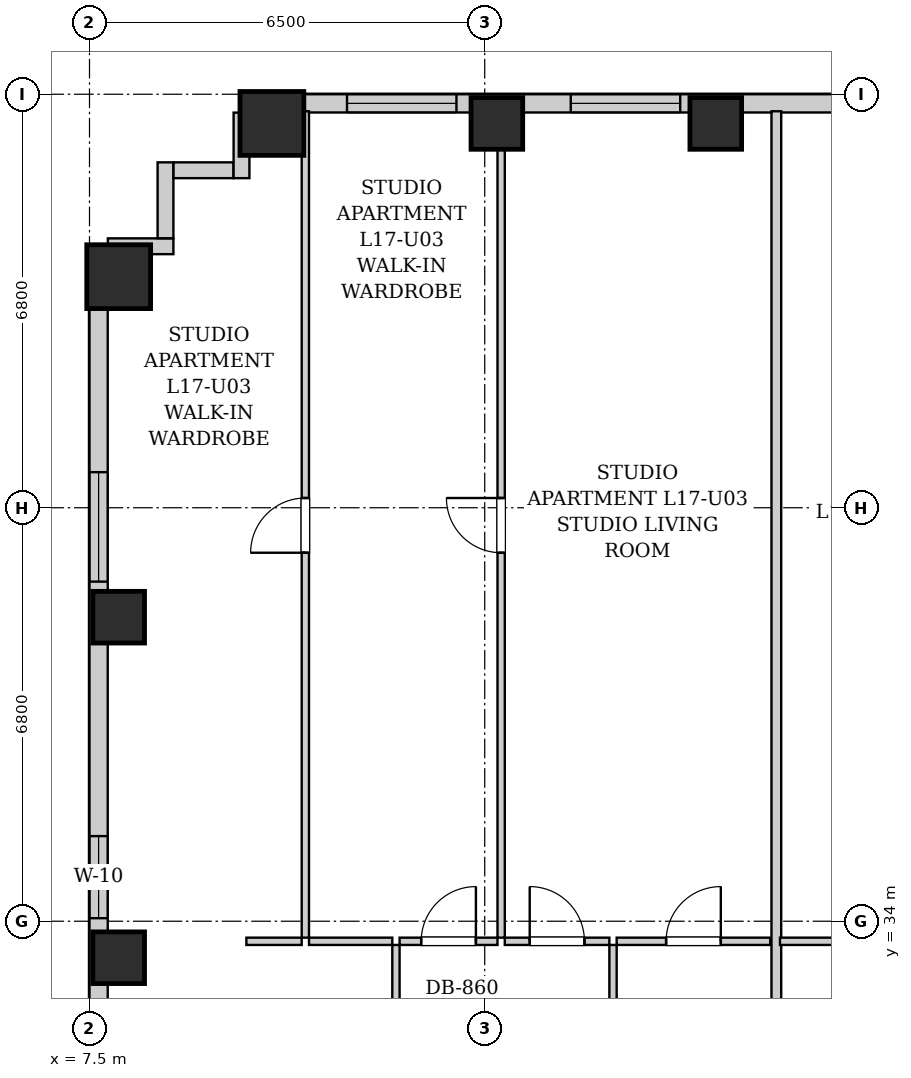
"""IFC4 building model, lengths in metres.
Left out: names, types, materials, properties, quantities, classifications, styles, units other than length and angle.
Written with IfcOpenShell. Run it as: python <this file> out.ifc"""

import sys

from ifc_helpers import new_model, si_unit, direction, frame, frame_2d, origin, origin_2d, place, context, subcontext, project, spatial, rectangle, extrude, element, fill, save


model = new_model("IFC4")
c1 = context("Model", 3, precision=1e-05, world=origin(), true_north=direction((0.0, 1.0)))
c2 = subcontext(c1, "Body", "Model", "MODEL_VIEW")
j1 = project(units=[si_unit("LENGTHUNIT", "METRE"), si_unit("PLANEANGLEUNIT", "RADIAN")], contexts=[c1])
p1 = place(None, origin())
s1 = spatial("IfcSite", under=j1, at=p1, CompositionType="ELEMENT")
p2 = place(p1, origin())
s2 = spatial("IfcBuilding", under=s1, at=p2, CompositionType="ELEMENT")
p3 = place(p2, frame((0.0, 0.0, 64.2)))
s3 = spatial("IfcBuildingStorey", under=s2, at=p3, CompositionType="ELEMENT", Elevation=64.2)
p4 = place(p3, frame((10.5, 47.12, 0.0), z_axis=(0.0, 0.0, 1.0), x_axis=(1.0, 0.0, 0.0)))
e1 = element("IfcColumn", 1, at=p4, inside=s3, PredefinedType="COLUMN", context=c2, shape_type="SweptSolid", body=[
    extrude(rectangle(XDim=1.05, YDim=1.05, at=origin_2d()), origin(), (0.0, 0.0, 1.0), 3.2),
])
for number, where, z_axis, x_axis in (
    (2, (14.2, 47.12, 0.0), (0.0, 0.0, 1.0), (1.0, 0.0, 0.0)),
    (3, (17.8, 47.12, 0.0), (0.0, 0.0, 1.0), (1.0, 0.0, 0.0)),
    (4, (7.98, 33.4, 0.0), (0.0, 0.0, 1.0), (1.0, 0.0, 0.0)),
    (5, (7.98, 39.0, 0.0), (0.0, 0.0, 1.0), (1.0, 0.0, 0.0)),
):
    element("IfcColumn", number, at=place(p3, frame(where, z_axis=z_axis, x_axis=x_axis)), inside=s3, PredefinedType="COLUMN", context=c2, shape_type="SweptSolid", body=[
        extrude(rectangle(XDim=0.85, YDim=0.85, at=origin_2d()), origin(), (0.0, 0.0, 1.0), 3.2),
    ])
p5 = place(p3, frame((7.98, 44.6, 0.0), z_axis=(0.0, 0.0, 1.0), x_axis=(1.0, 0.0, 0.0)))
e6 = element("IfcColumn", 6, at=p5, inside=s3, PredefinedType="COLUMN", context=c2, shape_type="SweptSolid", body=[
    extrude(rectangle(XDim=1.05, YDim=1.05, at=origin_2d()), origin(), (0.0, 0.0, 1.0), 3.2),
])
p6 = place(p3, frame((10.0, 47.45, 0.0), z_axis=(0.0, 0.0, 1.0), x_axis=(1.0, 0.0, 0.0)))
e7 = element("IfcWall", 7, at=p6, inside=s3, PredefinedType="SOLIDWALL", context=c2, shape_type="SweptSolid", body=[
    extrude(rectangle(XDim=26.35, YDim=0.3, at=frame_2d((13.175, 0.0))), origin(), (0.0, 0.0, 1.0), 1.975),
])
p7 = place(p6, frame((1.735, 0.0, 0.55)))
e8 = element("IfcOpeningElement", 8, at=p7, cuts=e7, PredefinedType="OPENING", context=c2, shape_type="SweptSolid", body=[
    extrude(rectangle(XDim=1.8, YDim=1.2, at=frame_2d((0.9, 0.6))), frame((0.0, 0.16, 0.0), z_axis=(0.0, -1.0, 0.0), x_axis=(1.0, 0.0, 0.0)), (0.0, 0.0, 1.0), 0.32),
])
p8 = place(p6, frame((5.415, 0.0, 0.55)))
e9 = element("IfcOpeningElement", 9, at=p8, cuts=e7, PredefinedType="OPENING", context=c2, shape_type="SweptSolid", body=[
    extrude(rectangle(XDim=1.8, YDim=1.2, at=frame_2d((0.9, 0.6))), frame((0.0, 0.16, 0.0), z_axis=(0.0, -1.0, 0.0), x_axis=(1.0, 0.0, 0.0)), (0.0, 0.0, 1.0), 0.32),
])
p9 = place(p6, frame((10.618, 0.0, 0.55)))
e10 = element("IfcOpeningElement", 10, at=p9, cuts=e7, PredefinedType="OPENING", context=c2, shape_type="SweptSolid", body=[
    extrude(rectangle(XDim=1.8, YDim=1.2, at=frame_2d((0.9, 0.6))), frame((0.0, 0.16, 0.0), z_axis=(0.0, -1.0, 0.0), x_axis=(1.0, 0.0, 0.0)), (0.0, 0.0, 1.0), 0.32),
])
p10 = place(p6, frame((17.696, 0.0, 0.55)))
e11 = element("IfcOpeningElement", 11, at=p10, cuts=e7, PredefinedType="OPENING", context=c2, shape_type="SweptSolid", body=[
    extrude(rectangle(XDim=1.8, YDim=1.2, at=frame_2d((0.9, 0.6))), frame((0.0, 0.16, 0.0), z_axis=(0.0, -1.0, 0.0), x_axis=(1.0, 0.0, 0.0)), (0.0, 0.0, 1.0), 0.32),
])
p11 = place(p6, frame((20.815, 0.0, 0.55)))
e12 = element("IfcOpeningElement", 12, at=p11, cuts=e7, PredefinedType="OPENING", context=c2, shape_type="SweptSolid", body=[
    extrude(rectangle(XDim=1.8, YDim=1.2, at=frame_2d((0.9, 0.6))), frame((0.0, 0.16, 0.0), z_axis=(0.0, -1.0, 0.0), x_axis=(1.0, 0.0, 0.0)), (0.0, 0.0, 1.0), 0.32),
])
p12 = place(p6, frame((23.785, 0.0, 0.55)))
e13 = element("IfcOpeningElement", 13, at=p12, cuts=e7, PredefinedType="OPENING", context=c2, shape_type="SweptSolid", body=[
    extrude(rectangle(XDim=1.35, YDim=1.2, at=frame_2d((0.675, 0.6))), frame((0.0, 0.16, 0.0), z_axis=(0.0, -1.0, 0.0), x_axis=(1.0, 0.0, 0.0)), (0.0, 0.0, 1.0), 0.32),
])
p13 = place(p3, frame((7.65, 2.5, 0.0), z_axis=(0.0, 0.0, 1.0), x_axis=(0.0, 1.0, 0.0)))
e14 = element("IfcWall", 14, at=p13, inside=s3, PredefinedType="SOLIDWALL", context=c2, shape_type="SweptSolid", body=[
    extrude(rectangle(XDim=42.6, YDim=0.3, at=frame_2d((21.3, 0.0))), origin(), (0.0, 0.0, 1.0), 1.975),
])
p14 = place(p13, frame((3.15, 0.0, 0.55)))
e15 = element("IfcOpeningElement", 15, at=p14, cuts=e14, PredefinedType="OPENING", context=c2, shape_type="SweptSolid", body=[
    extrude(rectangle(XDim=1.8, YDim=1.2, at=frame_2d((0.9, 0.6))), frame((0.0, 0.16, 0.0), z_axis=(0.0, -1.0, 0.0), x_axis=(1.0, 0.0, 0.0)), (0.0, 0.0, 1.0), 0.32),
])
p15 = place(p13, frame((1.185, 0.0, 0.55)))
e16 = element("IfcOpeningElement", 16, at=p15, cuts=e14, PredefinedType="OPENING", context=c2, shape_type="SweptSolid", body=[
    extrude(rectangle(XDim=1.35, YDim=1.2, at=frame_2d((0.675, 0.6))), frame((0.0, 0.16, 0.0), z_axis=(0.0, -1.0, 0.0), x_axis=(1.0, 0.0, 0.0)), (0.0, 0.0, 1.0), 0.32),
])
p16 = place(p13, frame((37.085, 0.0, 0.55)))
e17 = element("IfcOpeningElement", 17, at=p16, cuts=e14, PredefinedType="OPENING", context=c2, shape_type="SweptSolid", body=[
    extrude(rectangle(XDim=1.8, YDim=1.2, at=frame_2d((0.9, 0.6))), frame((0.0, 0.16, 0.0), z_axis=(0.0, -1.0, 0.0), x_axis=(1.0, 0.0, 0.0)), (0.0, 0.0, 1.0), 0.32),
])
p17 = place(p13, frame((31.55, 0.0, 0.55)))
e18 = element("IfcOpeningElement", 18, at=p17, cuts=e14, PredefinedType="OPENING", context=c2, shape_type="SweptSolid", body=[
    extrude(rectangle(XDim=1.35, YDim=1.2, at=frame_2d((0.675, 0.6))), frame((0.0, 0.16, 0.0), z_axis=(0.0, -1.0, 0.0), x_axis=(1.0, 0.0, 0.0)), (0.0, 0.0, 1.0), 0.32),
])
p18 = place(p13, frame((15.2, 0.0, 0.55)))
e19 = element("IfcOpeningElement", 19, at=p18, cuts=e14, PredefinedType="OPENING", context=c2, shape_type="SweptSolid", body=[
    extrude(rectangle(XDim=1.8, YDim=1.2, at=frame_2d((0.9, 0.6))), frame((0.0, 0.16, 0.0), z_axis=(0.0, -1.0, 0.0), x_axis=(1.0, 0.0, 0.0)), (0.0, 0.0, 1.0), 0.32),
])
p19 = place(p13, frame((13.085, 0.0, 0.55)))
e20 = element("IfcOpeningElement", 20, at=p19, cuts=e14, PredefinedType="OPENING", context=c2, shape_type="SweptSolid", body=[
    extrude(rectangle(XDim=1.35, YDim=1.2, at=frame_2d((0.675, 0.6))), frame((0.0, 0.16, 0.0), z_axis=(0.0, -1.0, 0.0), x_axis=(1.0, 0.0, 0.0)), (0.0, 0.0, 1.0), 0.32),
])
p20 = place(p13, frame((22.575, 0.0, 0.55)))
e21 = element("IfcOpeningElement", 21, at=p20, cuts=e14, PredefinedType="OPENING", context=c2, shape_type="SweptSolid", body=[
    extrude(rectangle(XDim=1.8, YDim=1.2, at=frame_2d((0.9, 0.6))), frame((0.0, 0.16, 0.0), z_axis=(0.0, -1.0, 0.0), x_axis=(1.0, 0.0, 0.0)), (0.0, 0.0, 1.0), 0.32),
])
p21 = place(p3, frame((7.802, 45.1, 0.0), z_axis=(0.0, 0.0, 1.0), x_axis=(1.0, 0.0, 0.0)))
e22 = element("IfcWall", 22, at=p21, inside=s3, PredefinedType="SOLIDWALL", context=c2, shape_type="SweptSolid", body=[
    extrude(rectangle(XDim=1.078, YDim=0.26, at=frame_2d((0.539, 0.0))), origin(), (0.0, 0.0, 1.0), 2.94),
])
p22 = place(p3, frame((8.75, 45.232, 0.0), z_axis=(0.0, 0.0, 1.0), x_axis=(0.0, 1.0, 0.0)))
e23 = element("IfcWall", 23, at=p22, inside=s3, PredefinedType="SOLIDWALL", context=c2, shape_type="SweptSolid", body=[
    extrude(rectangle(XDim=1.248, YDim=0.26, at=frame_2d((0.624, 0.0))), origin(), (0.0, 0.0, 1.0), 2.94),
])
p23 = place(p3, frame((8.882, 46.35, 0.0), z_axis=(0.0, 0.0, 1.0), x_axis=(1.0, 0.0, 0.0)))
e24 = element("IfcWall", 24, at=p23, inside=s3, PredefinedType="SOLIDWALL", context=c2, shape_type="SweptSolid", body=[
    extrude(rectangle(XDim=0.986, YDim=0.26, at=frame_2d((0.493, 0.0))), origin(), (0.0, 0.0, 1.0), 2.94),
])
p24 = place(p3, frame((10.0, 46.22, 0.0), z_axis=(0.0, 0.0, 1.0), x_axis=(0.0, 1.0, 0.0)))
e25 = element("IfcWall", 25, at=p24, inside=s3, PredefinedType="SOLIDWALL", context=c2, shape_type="SweptSolid", body=[
    extrude(rectangle(XDim=1.078, YDim=0.26, at=frame_2d((0.539, 0.0))), origin(), (0.0, 0.0, 1.0), 2.94),
])
p25 = place(p3, frame((12.54, 30.76, 0.0), z_axis=(0.0, 0.0, 1.0), x_axis=(0.0, 1.0, 0.0)))
e26 = element("IfcWall", 26, at=p25, inside=s3, PredefinedType="PARTITIONING", context=c2, shape_type="SweptSolid", body=[
    extrude(rectangle(XDim=2.85, YDim=0.12, at=frame_2d((1.425, 0.0))), origin(), (0.0, 0.0, 1.0), 2.94),
])
p26 = place(p25, frame((0.995, 0.0, 0.0)))
e27 = element("IfcOpeningElement", 27, at=p26, cuts=e26, PredefinedType="OPENING", context=c2, shape_type="SweptSolid", body=[
    extrude(rectangle(XDim=0.86, YDim=2.05, at=frame_2d((0.43, 1.025))), frame((0.0, 0.07, 0.0), z_axis=(0.0, -1.0, 0.0), x_axis=(1.0, 0.0, 0.0)), (0.0, 0.0, 1.0), 0.14),
])
p27 = place(p3, frame((10.08, 33.67, 0.0), z_axis=(0.0, 0.0, 1.0), x_axis=(1.0, 0.0, 0.0)))
e28 = element("IfcWall", 28, at=p27, inside=s3, PredefinedType="PARTITIONING", context=c2, shape_type="SweptSolid", body=[
    extrude(rectangle(XDim=0.91, YDim=0.12, at=frame_2d((0.455, 0.0))), origin(), (0.0, 0.0, 1.0), 2.94),
])
p28 = place(p3, frame((11.11, 33.67, 0.0), z_axis=(0.0, 0.0, 1.0), x_axis=(1.0, 0.0, 0.0)))
e29 = element("IfcWall", 29, at=p28, inside=s3, PredefinedType="PARTITIONING", context=c2, shape_type="SweptSolid", body=[
    extrude(rectangle(XDim=1.37, YDim=0.12, at=frame_2d((0.685, 0.0))), origin(), (0.0, 0.0, 1.0), 2.94),
])
p29 = place(p3, frame((16.11, 30.76, 0.0), z_axis=(0.0, 0.0, 1.0), x_axis=(0.0, 1.0, 0.0)))
e30 = element("IfcWall", 30, at=p29, inside=s3, PredefinedType="PARTITIONING", context=c2, shape_type="SweptSolid", body=[
    extrude(rectangle(XDim=2.85, YDim=0.12, at=frame_2d((1.425, 0.0))), origin(), (0.0, 0.0, 1.0), 2.94),
])
p30 = place(p29, frame((0.975, 0.0, 0.0)))
e31 = element("IfcOpeningElement", 31, at=p30, cuts=e30, PredefinedType="OPENING", context=c2, shape_type="SweptSolid", body=[
    extrude(rectangle(XDim=0.9, YDim=2.05, at=frame_2d((0.45, 1.025))), frame((0.0, 0.07, 0.0), z_axis=(0.0, -1.0, 0.0), x_axis=(1.0, 0.0, 0.0)), (0.0, 0.0, 1.0), 0.14),
])
p31 = place(p3, frame((12.6, 33.67, 0.0), z_axis=(0.0, 0.0, 1.0), x_axis=(1.0, 0.0, 0.0)))
e32 = element("IfcWall", 32, at=p31, inside=s3, PredefinedType="PARTITIONING", context=c2, shape_type="SweptSolid", body=[
    extrude(rectangle(XDim=1.61, YDim=0.12, at=frame_2d((0.805, 0.0))), origin(), (0.0, 0.0, 1.0), 2.94),
])
p32 = place(p31, frame((0.355, 0.0, 0.0)))
e33 = element("IfcOpeningElement", 33, at=p32, cuts=e32, PredefinedType="OPENING", context=c2, shape_type="SweptSolid", body=[
    extrude(rectangle(XDim=0.9, YDim=2.05, at=frame_2d((0.45, 1.025))), frame((0.0, 0.07, 0.0), z_axis=(0.0, -1.0, 0.0), x_axis=(1.0, 0.0, 0.0)), (0.0, 0.0, 1.0), 0.14),
])
p33 = place(p3, frame((14.33, 33.67, 0.0), z_axis=(0.0, 0.0, 1.0), x_axis=(1.0, 0.0, 0.0)))
e34 = element("IfcWall", 34, at=p33, inside=s3, PredefinedType="PARTITIONING", context=c2, shape_type="SweptSolid", body=[
    extrude(rectangle(XDim=1.72, YDim=0.12, at=frame_2d((0.86, 0.0))), origin(), (0.0, 0.0, 1.0), 2.94),
])
p34 = place(p33, frame((0.41, 0.0, 0.0)))
e35 = element("IfcOpeningElement", 35, at=p34, cuts=e34, PredefinedType="OPENING", context=c2, shape_type="SweptSolid", body=[
    extrude(rectangle(XDim=0.9, YDim=2.05, at=frame_2d((0.45, 1.025))), frame((0.0, 0.07, 0.0), z_axis=(0.0, -1.0, 0.0), x_axis=(1.0, 0.0, 0.0)), (0.0, 0.0, 1.0), 0.14),
])
p35 = place(p3, frame((16.17, 33.67, 0.0), z_axis=(0.0, 0.0, 1.0), x_axis=(1.0, 0.0, 0.0)))
e36 = element("IfcWall", 36, at=p35, inside=s3, PredefinedType="PARTITIONING", context=c2, shape_type="SweptSolid", body=[
    extrude(rectangle(XDim=2.526, YDim=0.12, at=frame_2d((1.263, 0.0))), origin(), (0.0, 0.0, 1.0), 2.94),
])
p36 = place(p35, frame((0.813, 0.0, 0.0)))
e37 = element("IfcOpeningElement", 37, at=p36, cuts=e36, PredefinedType="OPENING", context=c2, shape_type="SweptSolid", body=[
    extrude(rectangle(XDim=0.9, YDim=2.05, at=frame_2d((0.45, 1.025))), frame((0.0, 0.07, 0.0), z_axis=(0.0, -1.0, 0.0), x_axis=(1.0, 0.0, 0.0)), (0.0, 0.0, 1.0), 0.14),
])
p37 = place(p3, frame((11.05, 33.73, 0.0), z_axis=(0.0, 0.0, 1.0), x_axis=(0.0, 1.0, 0.0)))
e38 = element("IfcWall", 38, at=p37, inside=s3, PredefinedType="PARTITIONING", context=c2, shape_type="SweptSolid", body=[
    extrude(rectangle(XDim=13.59, YDim=0.12, at=frame_2d((6.795, 0.0))), origin(), (0.0, 0.0, 1.0), 2.94),
])
p38 = place(p37, frame((6.33, 0.0, 0.0)))
e39 = element("IfcOpeningElement", 39, at=p38, cuts=e38, PredefinedType="OPENING", context=c2, shape_type="SweptSolid", body=[
    extrude(rectangle(XDim=0.9, YDim=2.05, at=frame_2d((0.45, 1.025))), frame((0.0, 0.07, 0.0), z_axis=(0.0, -1.0, 0.0), x_axis=(1.0, 0.0, 0.0)), (0.0, 0.0, 1.0), 0.14),
])
p39 = place(p3, frame((14.27, 33.73, 0.0), z_axis=(0.0, 0.0, 1.0), x_axis=(0.0, 1.0, 0.0)))
e40 = element("IfcWall", 40, at=p39, inside=s3, PredefinedType="PARTITIONING", context=c2, shape_type="SweptSolid", body=[
    extrude(rectangle(XDim=13.59, YDim=0.12, at=frame_2d((6.795, 0.0))), origin(), (0.0, 0.0, 1.0), 2.94),
])
p40 = place(p39, frame((6.33, 0.0, 0.0)))
e41 = element("IfcOpeningElement", 41, at=p40, cuts=e40, PredefinedType="OPENING", context=c2, shape_type="SweptSolid", body=[
    extrude(rectangle(XDim=0.9, YDim=2.05, at=frame_2d((0.45, 1.025))), frame((0.0, 0.07, 0.0), z_axis=(0.0, -1.0, 0.0), x_axis=(1.0, 0.0, 0.0)), (0.0, 0.0, 1.0), 0.14),
])
p41 = place(p3, frame((18.796, 30.76, 0.0), z_axis=(0.0, 0.0, 1.0), x_axis=(0.0, 1.0, 0.0)))
e42 = element("IfcWall", 42, at=p41, inside=s3, PredefinedType="PARTITIONING", context=c2, shape_type="SweptSolid", body=[
    extrude(rectangle(XDim=16.56, YDim=0.16, at=frame_2d((8.28, 0.0))), origin(), (0.0, 0.0, 1.0), 2.94),
])
p42 = place(p3, frame((18.856, 33.67, 0.0), z_axis=(0.0, 0.0, 1.0), x_axis=(1.0, 0.0, 0.0)))
e43 = element("IfcWall", 43, at=p42, inside=s3, PredefinedType="PARTITIONING", context=c2, shape_type="SweptSolid", body=[
    extrude(rectangle(XDim=1.85, YDim=0.12, at=frame_2d((0.925, 0.0))), origin(), (0.0, 0.0, 1.0), 2.94),
])
p43 = place(p32, origin())
e44 = element("IfcDoor", 44, at=p43, inside=s3, OperationType="SINGLE_SWING_RIGHT", PredefinedType="DOOR", context=c2, shape_type="SweptSolid", body=[
    extrude(rectangle(XDim=0.9, YDim=2.05, at=frame_2d((0.45, 1.025))), frame((0.0, 0.025, 0.0), z_axis=(0.0, -1.0, 0.0), x_axis=(1.0, 0.0, 0.0)), (0.0, 0.0, 1.0), 0.05),
])
fill(e33, e44)
p44 = place(p34, origin())
e45 = element("IfcDoor", 45, at=p44, inside=s3, OperationType="SINGLE_SWING_LEFT", PredefinedType="DOOR", context=c2, shape_type="SweptSolid", body=[
    extrude(rectangle(XDim=0.9, YDim=2.05, at=frame_2d((0.45, 1.025))), frame((0.0, 0.025, 0.0), z_axis=(0.0, -1.0, 0.0), x_axis=(1.0, 0.0, 0.0)), (0.0, 0.0, 1.0), 0.05),
])
fill(e35, e45)
p45 = place(p36, origin())
e46 = element("IfcDoor", 46, at=p45, inside=s3, OperationType="SINGLE_SWING_RIGHT", PredefinedType="DOOR", context=c2, shape_type="SweptSolid", body=[
    extrude(rectangle(XDim=0.9, YDim=2.05, at=frame_2d((0.45, 1.025))), frame((0.0, 0.025, 0.0), z_axis=(0.0, -1.0, 0.0), x_axis=(1.0, 0.0, 0.0)), (0.0, 0.0, 1.0), 0.05),
])
fill(e37, e46)
p46 = place(p38, origin())
e47 = element("IfcDoor", 47, at=p46, inside=s3, OperationType="SINGLE_SWING_LEFT", PredefinedType="DOOR", context=c2, shape_type="SweptSolid", body=[
    extrude(rectangle(XDim=0.9, YDim=2.05, at=frame_2d((0.45, 1.025))), frame((0.0, 0.025, 0.0), z_axis=(0.0, -1.0, 0.0), x_axis=(1.0, 0.0, 0.0)), (0.0, 0.0, 1.0), 0.05),
])
fill(e39, e47)
p47 = place(p40, origin())
e48 = element("IfcDoor", 48, at=p47, inside=s3, OperationType="SINGLE_SWING_RIGHT", PredefinedType="DOOR", context=c2, shape_type="SweptSolid", body=[
    extrude(rectangle(XDim=0.9, YDim=2.05, at=frame_2d((0.45, 1.025))), frame((0.0, 0.025, 0.0), z_axis=(0.0, -1.0, 0.0), x_axis=(1.0, 0.0, 0.0)), (0.0, 0.0, 1.0), 0.05),
])
fill(e41, e48)
p48 = place(p16, origin())
e49 = element("IfcWindow", 49, at=p48, inside=s3, PartitioningType="DOUBLE_PANEL_VERTICAL", PredefinedType="WINDOW", context=c2, shape_type="SweptSolid", body=[
    extrude(rectangle(XDim=1.8, YDim=1.2, at=frame_2d((0.9, 0.6))), frame((0.0, 0.03, 0.0), z_axis=(0.0, -1.0, 0.0), x_axis=(1.0, 0.0, 0.0)), (0.0, 0.0, 1.0), 0.06),
])
fill(e17, e49)
p49 = place(p17, origin())
e50 = element("IfcWindow", 50, at=p49, inside=s3, PartitioningType="SINGLE_PANEL", PredefinedType="WINDOW", context=c2, shape_type="SweptSolid", body=[
    extrude(rectangle(XDim=1.35, YDim=1.2, at=frame_2d((0.675, 0.6))), frame((0.0, 0.03, 0.0), z_axis=(0.0, -1.0, 0.0), x_axis=(1.0, 0.0, 0.0)), (0.0, 0.0, 1.0), 0.06),
])
fill(e18, e50)
p50 = place(p7, origin())
e51 = element("IfcWindow", 51, at=p50, inside=s3, PartitioningType="DOUBLE_PANEL_VERTICAL", PredefinedType="WINDOW", context=c2, shape_type="SweptSolid", body=[
    extrude(rectangle(XDim=1.8, YDim=1.2, at=frame_2d((0.9, 0.6))), frame((0.0, 0.03, 0.0), z_axis=(0.0, -1.0, 0.0), x_axis=(1.0, 0.0, 0.0)), (0.0, 0.0, 1.0), 0.06),
])
fill(e8, e51)
p51 = place(p8, origin())
e52 = element("IfcWindow", 52, at=p51, inside=s3, PartitioningType="DOUBLE_PANEL_VERTICAL", PredefinedType="WINDOW", context=c2, shape_type="SweptSolid", body=[
    extrude(rectangle(XDim=1.8, YDim=1.2, at=frame_2d((0.9, 0.6))), frame((0.0, 0.03, 0.0), z_axis=(0.0, -1.0, 0.0), x_axis=(1.0, 0.0, 0.0)), (0.0, 0.0, 1.0), 0.06),
])
fill(e9, e52)
save(model, sys.argv[1])
